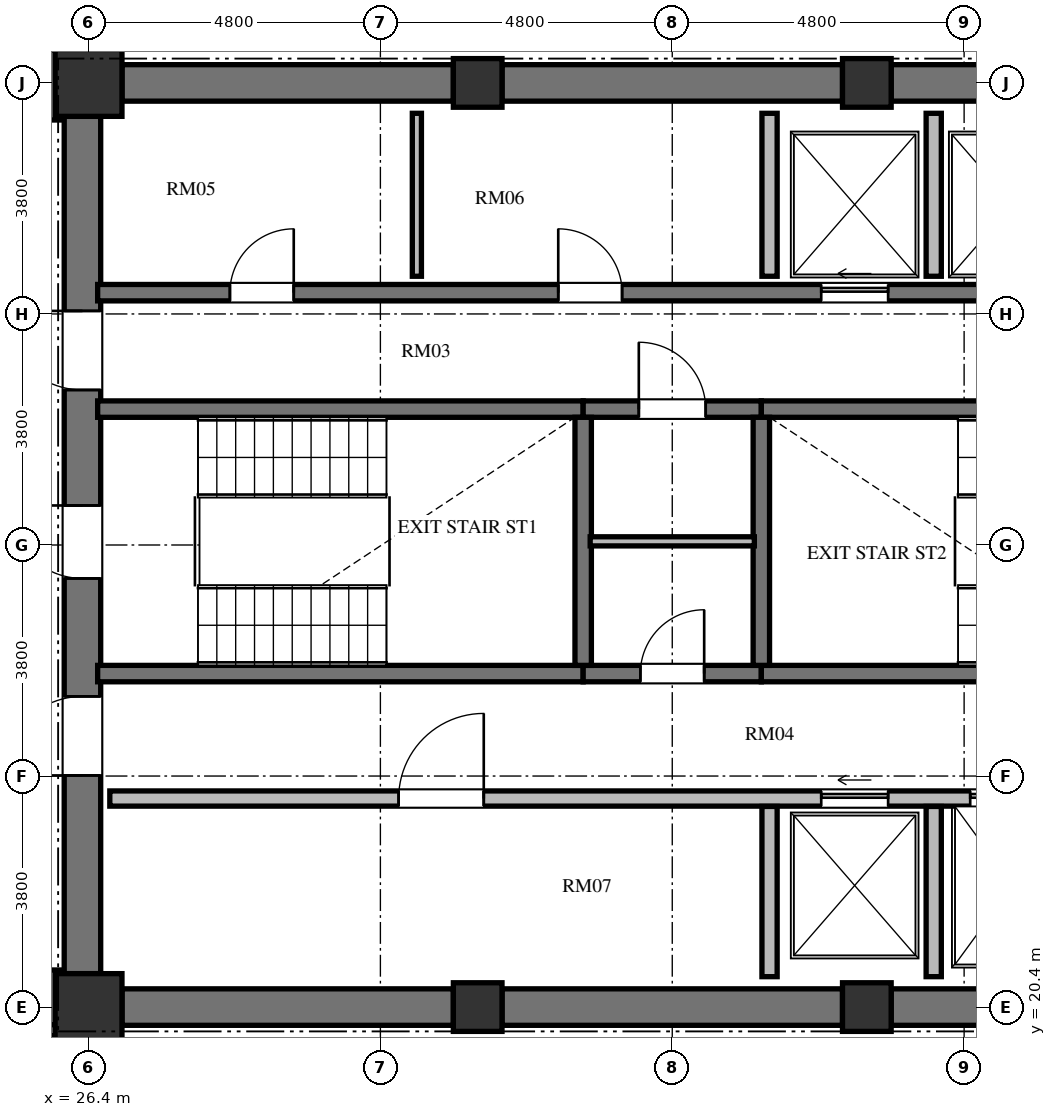
"""IFC4 building model, lengths in metres.
Left out: names, types, materials, properties, quantities, classifications, styles, units other than length and angle.
Written with IfcOpenShell. Run it as: python <this file> out.ifc"""

import sys

from ifc_helpers import new_model, si_unit, direction, frame, frame_2d, origin, origin_2d, place, context, subcontext, project, spatial, rectangle, extrude, element, fill, save


model = new_model("IFC4")
c1 = context("Model", 3, precision=1e-05, world=origin(), true_north=direction((0.0, 1.0)))
c2 = subcontext(c1, "Body", "Model", "MODEL_VIEW")
j1 = project(units=[si_unit("LENGTHUNIT", "METRE"), si_unit("PLANEANGLEUNIT", "RADIAN")], contexts=[c1])
p1 = place(None, origin())
s1 = spatial("IfcSite", under=j1, at=p1, CompositionType="ELEMENT")
p2 = place(p1, origin())
s2 = spatial("IfcBuilding", under=s1, at=p2, CompositionType="ELEMENT")
p3 = place(p2, frame((0.0, 0.0, 224.016)))
s3 = spatial("IfcBuildingStorey", under=s2, at=p3, CompositionType="ELEMENT", Elevation=224.016)
p4 = place(p3, frame((26.4, 20.4, 0.0), z_axis=(0.0, 0.0, 1.0), x_axis=(1.0, 0.0, 0.0)))
e1 = element("IfcColumn", 1, at=p4, inside=s3, PredefinedType="COLUMN", context=c2, shape_type="SweptSolid", body=[
    extrude(rectangle(XDim=1.1, YDim=1.1, at=origin_2d()), origin(), (0.0, 0.0, 1.0), 3.648),
])
for number, where, z_axis, x_axis in (
    (2, (32.8, 20.4, 0.0), (0.0, 0.0, 1.0), (1.0, 0.0, 0.0)),
    (3, (39.2, 20.4, 0.0), (0.0, 0.0, 1.0), (1.0, 0.0, 0.0)),
    (4, (39.2, 35.6, 0.0), (0.0, 0.0, 1.0), (1.0, 0.0, 0.0)),
    (5, (32.8, 35.6, 0.0), (0.0, 0.0, 1.0), (1.0, 0.0, 0.0)),
):
    element("IfcColumn", number, at=place(p3, frame(where, z_axis=z_axis, x_axis=x_axis)), inside=s3, PredefinedType="COLUMN", context=c2, shape_type="SweptSolid", body=[
        extrude(rectangle(XDim=0.8, YDim=0.8, at=origin_2d()), origin(), (0.0, 0.0, 1.0), 3.648),
    ])
p5 = place(p3, frame((26.4, 35.6, 0.0), z_axis=(0.0, 0.0, 1.0), x_axis=(1.0, 0.0, 0.0)))
e6 = element("IfcColumn", 6, at=p5, inside=s3, PredefinedType="COLUMN", context=c2, shape_type="SweptSolid", body=[
    extrude(rectangle(XDim=1.1, YDim=1.1, at=origin_2d()), origin(), (0.0, 0.0, 1.0), 3.648),
])
p6 = place(p3, frame((26.3, 20.95, 0.0), z_axis=(0.0, 0.0, 1.0), x_axis=(0.0, 1.0, 0.0)))
e7 = element("IfcWall", 7, at=p6, inside=s3, PredefinedType="SHEAR", context=c2, shape_type="SweptSolid", body=[
    extrude(rectangle(XDim=14.1, YDim=0.6, at=frame_2d((7.05, 0.0))), origin(), (0.0, 0.0, 1.0), 3.648),
])
p7 = place(p6, frame((6.5, 0.0, 0.0)))
e8 = element("IfcOpeningElement", 8, at=p7, cuts=e7, PredefinedType="OPENING", context=c2, shape_type="SweptSolid", body=[
    extrude(rectangle(XDim=1.2, YDim=2.15, at=frame_2d((0.6, 1.075))), frame((0.0, 0.31, 0.0), z_axis=(0.0, -1.0, 0.0), x_axis=(1.0, 0.0, 0.0)), (0.0, 0.0, 1.0), 0.62),
])
p8 = place(p6, frame((9.6, 0.0, 0.0)))
e9 = element("IfcOpeningElement", 9, at=p8, cuts=e7, PredefinedType="OPENING", context=c2, shape_type="SweptSolid", body=[
    extrude(rectangle(XDim=1.3, YDim=2.2, at=frame_2d((0.65, 1.1))), frame((0.0, 0.31, 0.0), z_axis=(0.0, -1.0, 0.0), x_axis=(1.0, 0.0, 0.0)), (0.0, 0.0, 1.0), 0.62),
])
p9 = place(p6, frame((3.26, 0.0, 0.0)))
e10 = element("IfcOpeningElement", 10, at=p9, cuts=e7, PredefinedType="OPENING", context=c2, shape_type="SweptSolid", body=[
    extrude(rectangle(XDim=1.3, YDim=2.2, at=frame_2d((0.65, 1.1))), frame((0.0, 0.31, 0.0), z_axis=(0.0, -1.0, 0.0), x_axis=(1.0, 0.0, 0.0)), (0.0, 0.0, 1.0), 0.62),
])
for number, where, z_axis, x_axis in (
    (11, (26.95, 20.4, 0.0), (0.0, 0.0, 1.0), (1.0, 0.0, 0.0)),
    (12, (26.95, 35.6, 0.0), (0.0, 0.0, 1.0), (1.0, 0.0, 0.0)),
):
    element("IfcWall", number, at=place(p3, frame(where, z_axis=z_axis, x_axis=x_axis)), inside=s3, PredefinedType="SHEAR", context=c2, shape_type="SweptSolid", body=[
        extrude(rectangle(XDim=5.45, YDim=0.6, at=frame_2d((2.725, 0.0))), origin(), (0.0, 0.0, 1.0), 3.648),
    ])
for number, where, z_axis, x_axis in (
    (13, (33.2, 20.4, 0.0), (0.0, 0.0, 1.0), (1.0, 0.0, 0.0)),
    (14, (33.2, 35.6, 0.0), (0.0, 0.0, 1.0), (1.0, 0.0, 0.0)),
):
    element("IfcWall", number, at=place(p3, frame(where, z_axis=z_axis, x_axis=x_axis)), inside=s3, PredefinedType="SHEAR", context=c2, shape_type="SweptSolid", body=[
        extrude(rectangle(XDim=5.6, YDim=0.6, at=frame_2d((2.8, 0.0))), origin(), (0.0, 0.0, 1.0), 3.648),
    ])
for number, where, z_axis, x_axis in (
    (15, (39.6, 20.4, 0.0), (0.0, 0.0, 1.0), (1.0, 0.0, 0.0)),
    (16, (39.6, 35.6, 0.0), (0.0, 0.0, 1.0), (1.0, 0.0, 0.0)),
):
    element("IfcWall", number, at=place(p3, frame(where, z_axis=z_axis, x_axis=x_axis)), inside=s3, PredefinedType="SHEAR", context=c2, shape_type="SweptSolid", body=[
        extrude(rectangle(XDim=5.45, YDim=0.6, at=frame_2d((2.725, 0.0))), origin(), (0.0, 0.0, 1.0), 3.648),
    ])
p10 = place(p3, frame((26.55, 30.235, 0.0), z_axis=(0.0, 0.0, 1.0), x_axis=(1.0, 0.0, 0.0)))
e17 = element("IfcWall", 17, at=p10, inside=s3, PredefinedType="SHEAR", context=c2, shape_type="SweptSolid", body=[
    extrude(rectangle(XDim=7.985, YDim=0.27, at=frame_2d((3.992, 0.0))), origin(), (0.0, 0.0, 1.0), 3.648),
])
p11 = place(p3, frame((34.535, 30.235, 0.0), z_axis=(0.0, 0.0, 1.0), x_axis=(1.0, 0.0, 0.0)))
e18 = element("IfcWall", 18, at=p11, inside=s3, PredefinedType="SHEAR", context=c2, shape_type="SweptSolid", body=[
    extrude(rectangle(XDim=2.93, YDim=0.27, at=frame_2d((1.465, 0.0))), origin(), (0.0, 0.0, 1.0), 3.648),
])
p12 = place(p11, frame((0.915, 0.0, 0.0)))
e19 = element("IfcOpeningElement", 19, at=p12, cuts=e18, PredefinedType="OPENING", context=c2, shape_type="SweptSolid", body=[
    extrude(rectangle(XDim=1.1, YDim=2.15, at=frame_2d((0.55, 1.075))), frame((0.0, 0.145, 0.0), z_axis=(0.0, -1.0, 0.0), x_axis=(1.0, 0.0, 0.0)), (0.0, 0.0, 1.0), 0.29),
])
p13 = place(p3, frame((37.465, 30.235, 0.0), z_axis=(0.0, 0.0, 1.0), x_axis=(1.0, 0.0, 0.0)))
e20 = element("IfcWall", 20, at=p13, inside=s3, PredefinedType="SHEAR", context=c2, shape_type="SweptSolid", body=[
    extrude(rectangle(XDim=7.985, YDim=0.27, at=frame_2d((3.992, 0.0))), origin(), (0.0, 0.0, 1.0), 3.648),
])
p14 = place(p13, frame((6.455, 0.0, 0.0)))
e21 = element("IfcOpeningElement", 21, at=p14, cuts=e20, PredefinedType="OPENING", context=c2, shape_type="SweptSolid", body=[
    extrude(rectangle(XDim=1.2, YDim=2.15, at=frame_2d((0.6, 1.075))), frame((0.0, 0.145, 0.0), z_axis=(0.0, -1.0, 0.0), x_axis=(1.0, 0.0, 0.0)), (0.0, 0.0, 1.0), 0.29),
])
p15 = place(p3, frame((26.55, 25.885, 0.0), z_axis=(0.0, 0.0, 1.0), x_axis=(1.0, 0.0, 0.0)))
e22 = element("IfcWall", 22, at=p15, inside=s3, PredefinedType="SHEAR", context=c2, shape_type="SweptSolid", body=[
    extrude(rectangle(XDim=7.985, YDim=0.27, at=frame_2d((3.992, 0.0))), origin(), (0.0, 0.0, 1.0), 3.648),
])
p16 = place(p3, frame((34.535, 25.885, 0.0), z_axis=(0.0, 0.0, 1.0), x_axis=(1.0, 0.0, 0.0)))
e23 = element("IfcWall", 23, at=p16, inside=s3, PredefinedType="SHEAR", context=c2, shape_type="SweptSolid", body=[
    extrude(rectangle(XDim=2.93, YDim=0.27, at=frame_2d((1.465, 0.0))), origin(), (0.0, 0.0, 1.0), 3.648),
])
p17 = place(p16, frame((0.94, 0.0, 0.0)))
e24 = element("IfcOpeningElement", 24, at=p17, cuts=e23, PredefinedType="OPENING", context=c2, shape_type="SweptSolid", body=[
    extrude(rectangle(XDim=1.05, YDim=2.15, at=frame_2d((0.525, 1.075))), frame((0.0, 0.145, 0.0), z_axis=(0.0, -1.0, 0.0), x_axis=(1.0, 0.0, 0.0)), (0.0, 0.0, 1.0), 0.29),
])
p18 = place(p3, frame((37.465, 25.885, 0.0), z_axis=(0.0, 0.0, 1.0), x_axis=(1.0, 0.0, 0.0)))
e25 = element("IfcWall", 25, at=p18, inside=s3, PredefinedType="SHEAR", context=c2, shape_type="SweptSolid", body=[
    extrude(rectangle(XDim=7.985, YDim=0.27, at=frame_2d((3.992, 0.0))), origin(), (0.0, 0.0, 1.0), 3.648),
])
for number, where, z_axis, x_axis in (
    (26, (34.535, 26.02, 0.0), (0.0, 0.0, 1.0), (0.0, 1.0, 0.0)),
    (27, (37.465, 26.02, 0.0), (0.0, 0.0, 1.0), (0.0, 1.0, 0.0)),
):
    element("IfcWall", number, at=place(p3, frame(where, z_axis=z_axis, x_axis=x_axis)), inside=s3, PredefinedType="SHEAR", context=c2, shape_type="SweptSolid", body=[
        extrude(rectangle(XDim=4.08, YDim=0.27, at=frame_2d((2.04, 0.0))), origin(), (0.0, 0.0, 1.0), 3.648),
    ])
p19 = place(p3, frame((34.65, 28.06, 0.0), z_axis=(0.0, 0.0, 1.0), x_axis=(1.0, 0.0, 0.0)))
e28 = element("IfcWall", 28, at=p19, inside=s3, PredefinedType="PARTITIONING", context=c2, shape_type="SweptSolid", body=[
    extrude(rectangle(XDim=2.7, YDim=0.15, at=frame_2d((1.35, 0.0))), origin(), (0.0, 0.0, 1.0), 3.448),
])
p20 = place(p3, frame((26.55, 32.15, 0.0), z_axis=(0.0, 0.0, 1.0), x_axis=(1.0, 0.0, 0.0)))
e29 = element("IfcWall", 29, at=p20, inside=s3, PredefinedType="SHEAR", context=c2, shape_type="SweptSolid", body=[
    extrude(rectangle(XDim=16.4, YDim=0.27, at=frame_2d((8.2, 0.0))), origin(), (0.0, 0.0, 1.0), 3.648),
])
p21 = place(p20, frame((2.175, 0.0, 0.0)))
e30 = element("IfcOpeningElement", 30, at=p21, cuts=e29, PredefinedType="OPENING", context=c2, shape_type="SweptSolid", body=[
    extrude(rectangle(XDim=1.05, YDim=2.15, at=frame_2d((0.525, 1.075))), frame((0.0, 0.145, 0.0), z_axis=(0.0, -1.0, 0.0), x_axis=(1.0, 0.0, 0.0)), (0.0, 0.0, 1.0), 0.29),
])
p22 = place(p20, frame((7.575, 0.0, 0.0)))
e31 = element("IfcOpeningElement", 31, at=p22, cuts=e29, PredefinedType="OPENING", context=c2, shape_type="SweptSolid", body=[
    extrude(rectangle(XDim=1.05, YDim=2.15, at=frame_2d((0.525, 1.075))), frame((0.0, 0.145, 0.0), z_axis=(0.0, -1.0, 0.0), x_axis=(1.0, 0.0, 0.0)), (0.0, 0.0, 1.0), 0.29),
])
p23 = place(p20, frame((11.9, 0.0, 0.0)))
e32 = element("IfcOpeningElement", 32, at=p23, cuts=e29, PredefinedType="OPENING", context=c2, shape_type="SweptSolid", body=[
    extrude(rectangle(XDim=1.1, YDim=2.2, at=frame_2d((0.55, 1.1))), frame((0.0, 0.145, 0.0), z_axis=(0.0, -1.0, 0.0), x_axis=(1.0, 0.0, 0.0)), (0.0, 0.0, 1.0), 0.29),
])
p24 = place(p20, frame((14.5, 0.0, 0.0)))
e33 = element("IfcOpeningElement", 33, at=p24, cuts=e29, PredefinedType="OPENING", context=c2, shape_type="SweptSolid", body=[
    extrude(rectangle(XDim=1.1, YDim=2.2, at=frame_2d((0.55, 1.1))), frame((0.0, 0.145, 0.0), z_axis=(0.0, -1.0, 0.0), x_axis=(1.0, 0.0, 0.0)), (0.0, 0.0, 1.0), 0.29),
])
p25 = place(p3, frame((26.75, 23.83, 0.0), z_axis=(0.0, 0.0, 1.0), x_axis=(1.0, 0.0, 0.0)))
e34 = element("IfcWall", 34, at=p25, inside=s3, PredefinedType="SOLIDWALL", context=c2, shape_type="SweptSolid", body=[
    extrude(rectangle(XDim=16.2, YDim=0.25, at=frame_2d((8.1, 0.0))), origin(), (0.0, 0.0, 1.0), 3.448),
])
p26 = place(p25, frame((4.75, 0.0, 0.0)))
e35 = element("IfcOpeningElement", 35, at=p26, cuts=e34, PredefinedType="OPENING", context=c2, shape_type="SweptSolid", body=[
    extrude(rectangle(XDim=1.4, YDim=2.2, at=frame_2d((0.7, 1.1))), frame((0.0, 0.135, 0.0), z_axis=(0.0, -1.0, 0.0), x_axis=(1.0, 0.0, 0.0)), (0.0, 0.0, 1.0), 0.27),
])
p27 = place(p25, frame((11.7, 0.0, 0.0)))
e36 = element("IfcOpeningElement", 36, at=p27, cuts=e34, PredefinedType="OPENING", context=c2, shape_type="SweptSolid", body=[
    extrude(rectangle(XDim=1.1, YDim=2.2, at=frame_2d((0.55, 1.1))), frame((0.0, 0.135, 0.0), z_axis=(0.0, -1.0, 0.0), x_axis=(1.0, 0.0, 0.0)), (0.0, 0.0, 1.0), 0.27),
])
p28 = place(p25, frame((14.15, 0.0, 0.0)))
e37 = element("IfcOpeningElement", 37, at=p28, cuts=e34, PredefinedType="OPENING", context=c2, shape_type="SweptSolid", body=[
    extrude(rectangle(XDim=1.4, YDim=2.3, at=frame_2d((0.7, 1.15))), frame((0.0, 0.135, 0.0), z_axis=(0.0, -1.0, 0.0), x_axis=(1.0, 0.0, 0.0)), (0.0, 0.0, 1.0), 0.27),
])
p29 = place(p3, frame((37.6, 32.42, 0.0), z_axis=(0.0, 0.0, 1.0), x_axis=(0.0, 1.0, 0.0)))
e38 = element("IfcWall", 38, at=p29, inside=s3, PredefinedType="SOLIDWALL", context=c2, shape_type="SweptSolid", body=[
    extrude(rectangle(XDim=2.68, YDim=0.25, at=frame_2d((1.34, 0.0))), origin(), (0.0, 0.0, 1.0), 3.448),
])
p30 = place(p3, frame((37.6, 20.9, 0.0), z_axis=(0.0, 0.0, 1.0), x_axis=(0.0, 1.0, 0.0)))
e39 = element("IfcWall", 39, at=p30, inside=s3, PredefinedType="SOLIDWALL", context=c2, shape_type="SweptSolid", body=[
    extrude(rectangle(XDim=2.8, YDim=0.25, at=frame_2d((1.4, 0.0))), origin(), (0.0, 0.0, 1.0), 3.448),
])
p31 = place(p3, frame((40.3, 32.42, 0.0), z_axis=(0.0, 0.0, 1.0), x_axis=(0.0, 1.0, 0.0)))
e40 = element("IfcWall", 40, at=p31, inside=s3, PredefinedType="SOLIDWALL", context=c2, shape_type="SweptSolid", body=[
    extrude(rectangle(XDim=2.68, YDim=0.25, at=frame_2d((1.34, 0.0))), origin(), (0.0, 0.0, 1.0), 3.448),
])
p32 = place(p3, frame((40.3, 20.9, 0.0), z_axis=(0.0, 0.0, 1.0), x_axis=(0.0, 1.0, 0.0)))
e41 = element("IfcWall", 41, at=p32, inside=s3, PredefinedType="SOLIDWALL", context=c2, shape_type="SweptSolid", body=[
    extrude(rectangle(XDim=2.8, YDim=0.25, at=frame_2d((1.4, 0.0))), origin(), (0.0, 0.0, 1.0), 3.448),
])
p33 = place(p3, frame((31.8, 32.42, 0.0), z_axis=(0.0, 0.0, 1.0), x_axis=(0.0, 1.0, 0.0)))
e42 = element("IfcWall", 42, at=p33, inside=s3, PredefinedType="PARTITIONING", context=c2, shape_type="SweptSolid", body=[
    extrude(rectangle(XDim=2.68, YDim=0.15, at=frame_2d((1.34, 0.0))), origin(), (0.0, 0.0, 1.0), 3.448),
])
p34 = place(p3, frame((25.83, 36.14, 0.0), z_axis=(0.0, 0.0, 1.0), x_axis=(0.0, -1.0, 0.0)))
e43 = element("IfcWall", 43, at=p34, inside=s3, PredefinedType="PARTITIONING", context=c2, shape_type="SweptSolid", body=[
    extrude(rectangle(XDim=1.15, YDim=0.18, at=frame_2d((0.575, 0.0))), origin(), (0.0, 0.0, 1.0), 3.448),
])
p35 = place(p3, frame((25.83, 21.01, 0.0), z_axis=(0.0, 0.0, 1.0), x_axis=(0.0, -1.0, 0.0)))
e44 = element("IfcWall", 44, at=p35, inside=s3, PredefinedType="PARTITIONING", context=c2, shape_type="SweptSolid", body=[
    extrude(rectangle(XDim=1.03, YDim=0.18, at=frame_2d((0.515, 0.0))), origin(), (0.0, 0.0, 1.0), 3.448),
])
p36 = place(p3, frame((25.87, 20.02, 0.0), z_axis=(0.0, 0.0, 1.0), x_axis=(-1.0, 0.0, 0.0)))
e45 = element("IfcWall", 45, at=p36, inside=s3, PredefinedType="PARTITIONING", context=c2, shape_type="SweptSolid", body=[
    extrude(rectangle(XDim=2.56, YDim=0.18, at=frame_2d((1.28, 0.0))), origin(), (0.0, 0.0, 1.0), 3.448),
])
p37 = place(p7, origin())
e46 = element("IfcDoor", 46, at=p37, inside=s3, OperationType="SINGLE_SWING_RIGHT", PredefinedType="DOOR", context=c2, shape_type="SweptSolid", body=[
    extrude(rectangle(XDim=1.2, YDim=2.15, at=frame_2d((0.6, 1.075))), frame((0.0, 0.025, 0.0), z_axis=(0.0, -1.0, 0.0), x_axis=(1.0, 0.0, 0.0)), (0.0, 0.0, 1.0), 0.05),
])
fill(e8, e46)
p38 = place(p17, origin())
e47 = element("IfcDoor", 47, at=p38, inside=s3, OperationType="SINGLE_SWING_RIGHT", PredefinedType="DOOR", context=c2, shape_type="SweptSolid", body=[
    extrude(rectangle(XDim=1.05, YDim=2.15, at=frame_2d((0.525, 1.075))), frame((0.0, 0.025, 0.0), z_axis=(0.0, -1.0, 0.0), x_axis=(1.0, 0.0, 0.0)), (0.0, 0.0, 1.0), 0.05),
])
fill(e24, e47)
p39 = place(p12, origin())
e48 = element("IfcDoor", 48, at=p39, inside=s3, OperationType="SINGLE_SWING_LEFT", PredefinedType="DOOR", context=c2, shape_type="SweptSolid", body=[
    extrude(rectangle(XDim=1.1, YDim=2.15, at=frame_2d((0.55, 1.075))), frame((0.0, 0.025, 0.0), z_axis=(0.0, -1.0, 0.0), x_axis=(1.0, 0.0, 0.0)), (0.0, 0.0, 1.0), 0.05),
])
fill(e19, e48)
p40 = place(p8, origin())
e49 = element("IfcDoor", 49, at=p40, inside=s3, OperationType="SINGLE_SWING_RIGHT", PredefinedType="DOOR", context=c2, shape_type="SweptSolid", body=[
    extrude(rectangle(XDim=1.3, YDim=2.2, at=frame_2d((0.65, 1.1))), frame((0.0, 0.025, 0.0), z_axis=(0.0, -1.0, 0.0), x_axis=(1.0, 0.0, 0.0)), (0.0, 0.0, 1.0), 0.05),
])
fill(e9, e49)
p41 = place(p9, origin())
e50 = element("IfcDoor", 50, at=p41, inside=s3, OperationType="SINGLE_SWING_LEFT", PredefinedType="DOOR", context=c2, shape_type="SweptSolid", body=[
    extrude(rectangle(XDim=1.3, YDim=2.2, at=frame_2d((0.65, 1.1))), frame((0.0, 0.025, 0.0), z_axis=(0.0, -1.0, 0.0), x_axis=(1.0, 0.0, 0.0)), (0.0, 0.0, 1.0), 0.05),
])
fill(e10, e50)
p42 = place(p21, origin())
e51 = element("IfcDoor", 51, at=p42, inside=s3, OperationType="SINGLE_SWING_RIGHT", PredefinedType="DOOR", context=c2, shape_type="SweptSolid", body=[
    extrude(rectangle(XDim=1.05, YDim=2.15, at=frame_2d((0.525, 1.075))), frame((0.0, 0.025, 0.0), z_axis=(0.0, -1.0, 0.0), x_axis=(1.0, 0.0, 0.0)), (0.0, 0.0, 1.0), 0.05),
])
fill(e30, e51)
p43 = place(p22, origin())
e52 = element("IfcDoor", 52, at=p43, inside=s3, OperationType="SINGLE_SWING_LEFT", PredefinedType="DOOR", context=c2, shape_type="SweptSolid", body=[
    extrude(rectangle(XDim=1.05, YDim=2.15, at=frame_2d((0.525, 1.075))), frame((0.0, 0.025, 0.0), z_axis=(0.0, -1.0, 0.0), x_axis=(1.0, 0.0, 0.0)), (0.0, 0.0, 1.0), 0.05),
])
fill(e31, e52)
p44 = place(p26, origin())
e53 = element("IfcDoor", 53, at=p44, inside=s3, OperationType="SINGLE_SWING_RIGHT", PredefinedType="DOOR", context=c2, shape_type="SweptSolid", body=[
    extrude(rectangle(XDim=1.4, YDim=2.2, at=frame_2d((0.7, 1.1))), frame((0.0, 0.025, 0.0), z_axis=(0.0, -1.0, 0.0), x_axis=(1.0, 0.0, 0.0)), (0.0, 0.0, 1.0), 0.05),
])
fill(e35, e53)
p45 = place(p23, origin())
e54 = element("IfcDoor", 54, at=p45, inside=s3, OperationType="SLIDING_TO_LEFT", PredefinedType="DOOR", context=c2, shape_type="SweptSolid", body=[
    extrude(rectangle(XDim=1.1, YDim=2.2, at=frame_2d((0.55, 1.1))), frame((0.0, 0.025, 0.0), z_axis=(0.0, -1.0, 0.0), x_axis=(1.0, 0.0, 0.0)), (0.0, 0.0, 1.0), 0.05),
])
fill(e32, e54)
p46 = place(p27, origin())
e55 = element("IfcDoor", 55, at=p46, inside=s3, OperationType="SLIDING_TO_LEFT", PredefinedType="DOOR", context=c2, shape_type="SweptSolid", body=[
    extrude(rectangle(XDim=1.1, YDim=2.2, at=frame_2d((0.55, 1.1))), frame((0.0, 0.025, 0.0), z_axis=(0.0, -1.0, 0.0), x_axis=(1.0, 0.0, 0.0)), (0.0, 0.0, 1.0), 0.05),
])
fill(e36, e55)
p47 = place(p28, origin())
e56 = element("IfcDoor", 56, at=p47, inside=s3, OperationType="SLIDING_TO_LEFT", PredefinedType="DOOR", context=c2, shape_type="SweptSolid", body=[
    extrude(rectangle(XDim=1.4, YDim=2.3, at=frame_2d((0.7, 1.15))), frame((0.0, 0.025, 0.0), z_axis=(0.0, -1.0, 0.0), x_axis=(1.0, 0.0, 0.0)), (0.0, 0.0, 1.0), 0.05),
])
fill(e37, e56)
save(model, sys.argv[1])
